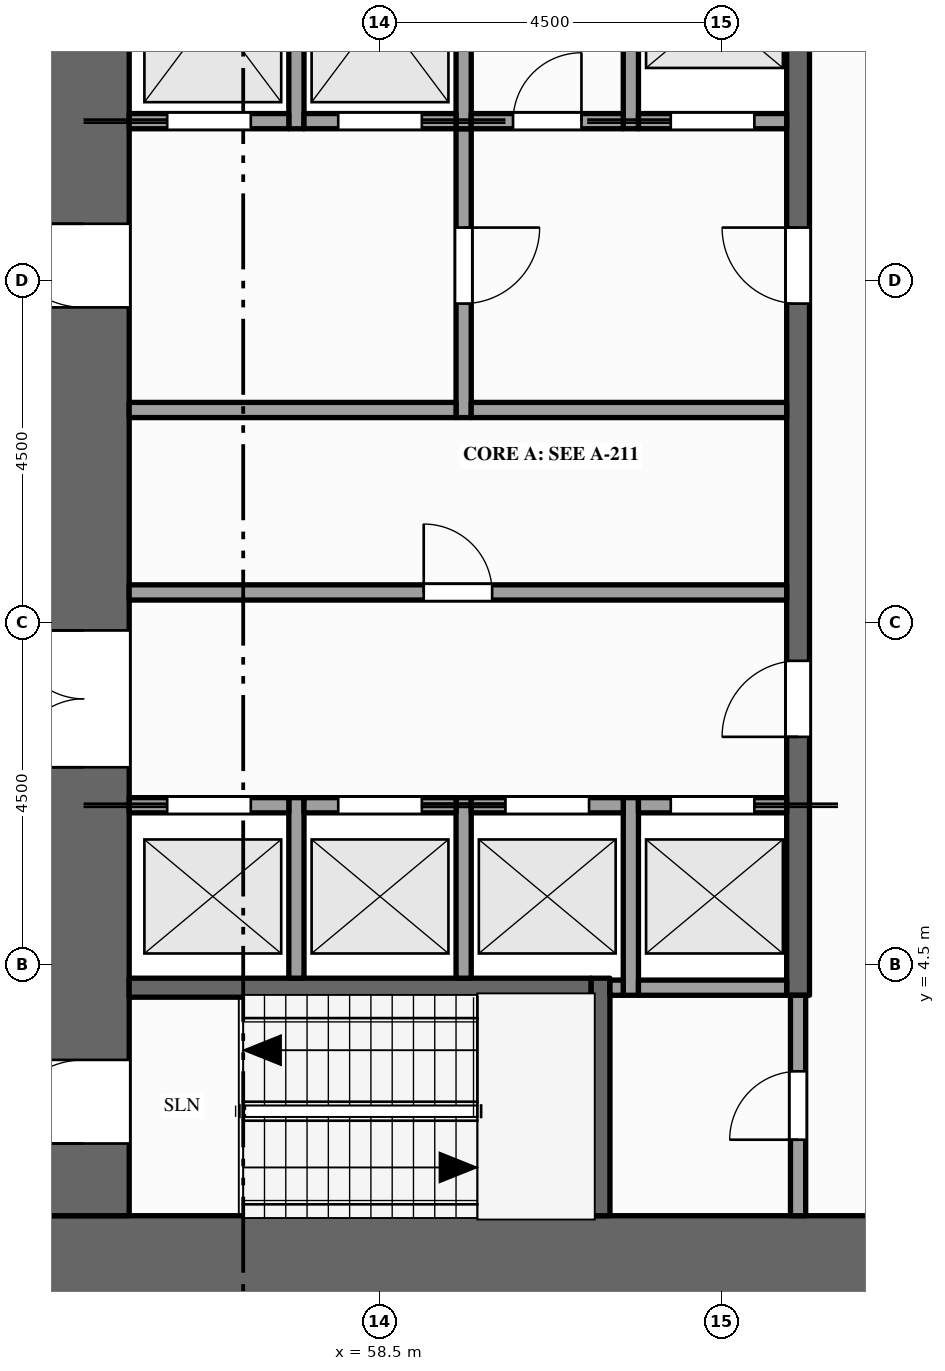
"""IFC4 building model, lengths in metres.
Left out: names, types, materials, properties, quantities, classifications, styles, units other than length and angle.
Written with IfcOpenShell. Run it as: python <this file> out.ifc"""

import sys

from ifc_helpers import new_model, si_unit, direction, frame, frame_2d, origin, place, context, subcontext, project, spatial, rectangle, extrude, element, fill, save


model = new_model("IFC4")
c1 = context("Model", 3, precision=1e-05, world=origin(), true_north=direction((0.0, 1.0)))
c2 = subcontext(c1, "Body", "Model", "MODEL_VIEW")
j1 = project(units=[si_unit("LENGTHUNIT", "METRE"), si_unit("PLANEANGLEUNIT", "RADIAN")], contexts=[c1])
p1 = place(None, origin())
s1 = spatial("IfcSite", under=j1, at=p1, CompositionType="ELEMENT")
p2 = place(p1, origin())
s2 = spatial("IfcBuilding", under=s1, at=p2, CompositionType="ELEMENT")
p3 = place(p2, frame((0.0, 0.0, 57.0)))
s3 = spatial("IfcBuildingStorey", under=s2, at=p3, CompositionType="ELEMENT", Elevation=57.0)
p4 = place(p3, frame((67.5, 0.6, -0.15), z_axis=(0.0, 0.0, 1.0), x_axis=(-1.0, 0.0, 0.0)))
e1 = element("IfcWall", 1, at=p4, inside=s3, PredefinedType="SHEAR", context=c2, shape_type="SweptSolid", body=[
    extrude(rectangle(XDim=13.5, YDim=1.2, at=frame_2d((6.75, 0.0))), origin(), (0.0, 0.0, 1.0), 4.0),
])
p5 = place(p3, frame((54.6, 1.2, -0.15), z_axis=(0.0, 0.0, 1.0), x_axis=(0.0, 1.0, 0.0)))
e2 = element("IfcWall", 2, at=p5, inside=s3, PredefinedType="SHEAR", context=c2, shape_type="SweptSolid", body=[
    extrude(rectangle(XDim=20.1, YDim=1.2, at=frame_2d((10.05, 0.0))), origin(), (0.0, 0.0, 1.0), 4.0),
])
p6 = place(p5, frame((5.9, 0.0, 0.15)))
e3 = element("IfcOpeningElement", 3, at=p6, cuts=e2, PredefinedType="OPENING", context=c2, shape_type="SweptSolid", body=[
    extrude(rectangle(XDim=1.8, YDim=2.1, at=frame_2d((0.9, 1.05))), frame((0.0, 0.61, 0.0), z_axis=(0.0, -1.0, 0.0), x_axis=(1.0, 0.0, 0.0)), (0.0, 0.0, 1.0), 1.22),
])
p7 = place(p5, frame((11.95, 0.0, 0.15)))
e4 = element("IfcOpeningElement", 4, at=p7, cuts=e2, PredefinedType="OPENING", context=c2, shape_type="SweptSolid", body=[
    extrude(rectangle(XDim=1.1, YDim=2.1, at=frame_2d((0.55, 1.05))), frame((0.0, 0.61, 0.0), z_axis=(0.0, -1.0, 0.0), x_axis=(1.0, 0.0, 0.0)), (0.0, 0.0, 1.0), 1.22),
])
p8 = place(p5, frame((0.95, 0.0, 0.15)))
e5 = element("IfcOpeningElement", 5, at=p8, cuts=e2, PredefinedType="OPENING", context=c2, shape_type="SweptSolid", body=[
    extrude(rectangle(XDim=1.1, YDim=2.1, at=frame_2d((0.55, 1.05))), frame((0.0, 0.61, 0.0), z_axis=(0.0, -1.0, 0.0), x_axis=(1.0, 0.0, 0.0)), (0.0, 0.0, 1.0), 1.22),
])
p9 = place(p5, frame((18.15, 0.0, 0.15)))
e6 = element("IfcOpeningElement", 6, at=p9, cuts=e2, PredefinedType="OPENING", context=c2, shape_type="SweptSolid", body=[
    extrude(rectangle(XDim=1.1, YDim=2.1, at=frame_2d((0.55, 1.05))), frame((0.0, 0.61, 0.0), z_axis=(0.0, -1.0, 0.0), x_axis=(1.0, 0.0, 0.0)), (0.0, 0.0, 1.0), 1.22),
])
p10 = place(p3, frame((57.4, 4.325, 0.0), z_axis=(0.0, 0.0, 1.0), x_axis=(0.0, 1.0, 0.0)))
e7 = element("IfcWall", 7, at=p10, inside=s3, PredefinedType="SOLIDWALL", context=c2, shape_type="SweptSolid", body=[
    extrude(rectangle(XDim=2.375, YDim=0.2, at=frame_2d((1.188, 0.0))), origin(), (0.0, 0.0, 1.0), 3.85),
])
p11 = place(p3, frame((57.4, 15.5, 0.0), z_axis=(0.0, 0.0, 1.0), x_axis=(0.0, 1.0, 0.0)))
e8 = element("IfcWall", 8, at=p11, inside=s3, PredefinedType="SOLIDWALL", context=c2, shape_type="SweptSolid", body=[
    extrude(rectangle(XDim=2.875, YDim=0.2, at=frame_2d((1.438, 0.0))), origin(), (0.0, 0.0, 1.0), 3.85),
])
p12 = place(p3, frame((59.6, 4.325, 0.0), z_axis=(0.0, 0.0, 1.0), x_axis=(0.0, 1.0, 0.0)))
e9 = element("IfcWall", 9, at=p12, inside=s3, PredefinedType="SOLIDWALL", context=c2, shape_type="SweptSolid", body=[
    extrude(rectangle(XDim=2.375, YDim=0.2, at=frame_2d((1.188, 0.0))), origin(), (0.0, 0.0, 1.0), 3.85),
])
p13 = place(p3, frame((59.6, 11.7, 0.0), z_axis=(0.0, 0.0, 1.0), x_axis=(0.0, 1.0, 0.0)))
e10 = element("IfcWall", 10, at=p13, inside=s3, PredefinedType="PARTITIONING", context=c2, shape_type="SweptSolid", body=[
    extrude(rectangle(XDim=3.8, YDim=0.2, at=frame_2d((1.9, 0.0))), origin(), (0.0, 0.0, 1.0), 3.85),
])
p14 = place(p13, frame((1.5, 0.0, 0.0)))
e11 = element("IfcOpeningElement", 11, at=p14, cuts=e10, PredefinedType="OPENING", context=c2, shape_type="SweptSolid", body=[
    extrude(rectangle(XDim=1.0, YDim=2.1, at=frame_2d((0.5, 1.05))), frame((0.0, 0.11, 0.0), z_axis=(0.0, -1.0, 0.0), x_axis=(1.0, 0.0, 0.0)), (0.0, 0.0, 1.0), 0.22),
])
p15 = place(p3, frame((59.6, 15.5, 0.0), z_axis=(0.0, 0.0, 1.0), x_axis=(0.0, 1.0, 0.0)))
e12 = element("IfcWall", 12, at=p15, inside=s3, PredefinedType="SOLIDWALL", context=c2, shape_type="SweptSolid", body=[
    extrude(rectangle(XDim=2.875, YDim=0.2, at=frame_2d((1.438, 0.0))), origin(), (0.0, 0.0, 1.0), 3.85),
])
p16 = place(p3, frame((61.4, 1.2, 0.0), z_axis=(0.0, 0.0, 1.0), x_axis=(0.0, 1.0, 0.0)))
e13 = element("IfcWall", 13, at=p16, inside=s3, PredefinedType="SHEAR", context=c2, shape_type="SweptSolid", body=[
    extrude(rectangle(XDim=3.125, YDim=0.25, at=frame_2d((1.562, 0.0))), origin(), (0.0, 0.0, 1.0), 3.85),
])
p17 = place(p3, frame((61.8, 4.1, 0.0), z_axis=(0.0, 0.0, 1.0), x_axis=(0.0, 1.0, 0.0)))
e14 = element("IfcWall", 14, at=p17, inside=s3, PredefinedType="SOLIDWALL", context=c2, shape_type="SweptSolid", body=[
    extrude(rectangle(XDim=2.6, YDim=0.2, at=frame_2d((1.3, 0.0))), origin(), (0.0, 0.0, 1.0), 3.85),
])
p18 = place(p3, frame((61.8, 15.5, 0.0), z_axis=(0.0, 0.0, 1.0), x_axis=(0.0, 1.0, 0.0)))
e15 = element("IfcWall", 15, at=p18, inside=s3, PredefinedType="SOLIDWALL", context=c2, shape_type="SweptSolid", body=[
    extrude(rectangle(XDim=3.1, YDim=0.2, at=frame_2d((1.55, 0.0))), origin(), (0.0, 0.0, 1.0), 3.85),
])
p19 = place(p3, frame((64.0, 1.2, 0.0), z_axis=(0.0, 0.0, 1.0), x_axis=(0.0, 1.0, 0.0)))
e16 = element("IfcWall", 16, at=p19, inside=s3, PredefinedType="PARTITIONING", context=c2, shape_type="SweptSolid", body=[
    extrude(rectangle(XDim=2.9, YDim=0.2, at=frame_2d((1.45, 0.0))), origin(), (0.0, 0.0, 1.0), 3.85),
])
p20 = place(p19, frame((1.0, 0.0, 0.0)))
e17 = element("IfcOpeningElement", 17, at=p20, cuts=e16, PredefinedType="OPENING", context=c2, shape_type="SweptSolid", body=[
    extrude(rectangle(XDim=0.9, YDim=2.1, at=frame_2d((0.45, 1.05))), frame((0.0, 0.11, 0.0), z_axis=(0.0, -1.0, 0.0), x_axis=(1.0, 0.0, 0.0)), (0.0, 0.0, 1.0), 0.22),
])
p21 = place(p3, frame((64.0, 4.1, 0.0), z_axis=(0.0, 0.0, 1.0), x_axis=(0.0, 1.0, 0.0)))
e18 = element("IfcWall", 18, at=p21, inside=s3, PredefinedType="SHEAR", context=c2, shape_type="SweptSolid", body=[
    extrude(rectangle(XDim=14.5, YDim=0.3, at=frame_2d((7.25, 0.0))), origin(), (0.0, 0.0, 1.0), 3.85),
])
p22 = place(p21, frame((3.4, 0.0, 0.0)))
e19 = element("IfcOpeningElement", 19, at=p22, cuts=e18, PredefinedType="OPENING", context=c2, shape_type="SweptSolid", body=[
    extrude(rectangle(XDim=1.0, YDim=2.1, at=frame_2d((0.5, 1.05))), frame((0.0, 0.16, 0.0), z_axis=(0.0, -1.0, 0.0), x_axis=(1.0, 0.0, 0.0)), (0.0, 0.0, 1.0), 0.32),
])
p23 = place(p21, frame((9.1, 0.0, 0.0)))
e20 = element("IfcOpeningElement", 20, at=p23, cuts=e18, PredefinedType="OPENING", context=c2, shape_type="SweptSolid", body=[
    extrude(rectangle(XDim=1.0, YDim=2.1, at=frame_2d((0.5, 1.05))), frame((0.0, 0.16, 0.0), z_axis=(0.0, -1.0, 0.0), x_axis=(1.0, 0.0, 0.0)), (0.0, 0.0, 1.0), 0.32),
])
p24 = place(p3, frame((55.2, 4.2, 0.0), z_axis=(0.0, 0.0, 1.0), x_axis=(1.0, 0.0, 0.0)))
e21 = element("IfcWall", 21, at=p24, inside=s3, PredefinedType="SHEAR", context=c2, shape_type="SweptSolid", body=[
    extrude(rectangle(XDim=6.075, YDim=0.25, at=frame_2d((3.038, 0.0))), origin(), (0.0, 0.0, 1.0), 3.85),
])
p25 = place(p3, frame((61.525, 4.2, 0.0), z_axis=(0.0, 0.0, 1.0), x_axis=(1.0, 0.0, 0.0)))
e22 = element("IfcWall", 22, at=p25, inside=s3, PredefinedType="SOLIDWALL", context=c2, shape_type="SweptSolid", body=[
    extrude(rectangle(XDim=0.175, YDim=0.2, at=frame_2d((0.087, 0.0))), origin(), (0.0, 0.0, 1.0), 3.85),
])
p26 = place(p3, frame((61.9, 4.2, 0.0), z_axis=(0.0, 0.0, 1.0), x_axis=(1.0, 0.0, 0.0)))
e23 = element("IfcWall", 23, at=p26, inside=s3, PredefinedType="SOLIDWALL", context=c2, shape_type="SweptSolid", body=[
    extrude(rectangle(XDim=1.95, YDim=0.2, at=frame_2d((0.975, 0.0))), origin(), (0.0, 0.0, 1.0), 3.85),
])
p27 = place(p3, frame((55.2, 6.6, 0.0), z_axis=(0.0, 0.0, 1.0), x_axis=(1.0, 0.0, 0.0)))
e24 = element("IfcWall", 24, at=p27, inside=s3, PredefinedType="SOLIDWALL", context=c2, shape_type="SweptSolid", body=[
    extrude(rectangle(XDim=2.1, YDim=0.2, at=frame_2d((1.05, 0.0))), origin(), (0.0, 0.0, 1.0), 3.85),
])
p28 = place(p27, frame((0.5, 0.0, 0.012)))
e25 = element("IfcOpeningElement", 25, at=p28, cuts=e24, PredefinedType="OPENING", context=c2, shape_type="SweptSolid", body=[
    extrude(rectangle(XDim=1.1, YDim=2.1, at=frame_2d((0.55, 1.05))), frame((0.0, 0.11, 0.0), z_axis=(0.0, -1.0, 0.0), x_axis=(1.0, 0.0, 0.0)), (0.0, 0.0, 1.0), 0.22),
])
p29 = place(p3, frame((57.5, 6.6, 0.0), z_axis=(0.0, 0.0, 1.0), x_axis=(1.0, 0.0, 0.0)))
e26 = element("IfcWall", 26, at=p29, inside=s3, PredefinedType="SOLIDWALL", context=c2, shape_type="SweptSolid", body=[
    extrude(rectangle(XDim=2.0, YDim=0.2, at=frame_2d((1.0, 0.0))), origin(), (0.0, 0.0, 1.0), 3.85),
])
p30 = place(p29, frame((0.45, 0.0, 0.012)))
e27 = element("IfcOpeningElement", 27, at=p30, cuts=e26, PredefinedType="OPENING", context=c2, shape_type="SweptSolid", body=[
    extrude(rectangle(XDim=1.1, YDim=2.1, at=frame_2d((0.55, 1.05))), frame((0.0, 0.11, 0.0), z_axis=(0.0, -1.0, 0.0), x_axis=(1.0, 0.0, 0.0)), (0.0, 0.0, 1.0), 0.22),
])
p31 = place(p3, frame((59.7, 6.6, 0.0), z_axis=(0.0, 0.0, 1.0), x_axis=(1.0, 0.0, 0.0)))
e28 = element("IfcWall", 28, at=p31, inside=s3, PredefinedType="SOLIDWALL", context=c2, shape_type="SweptSolid", body=[
    extrude(rectangle(XDim=2.0, YDim=0.2, at=frame_2d((1.0, 0.0))), origin(), (0.0, 0.0, 1.0), 3.85),
])
p32 = place(p31, frame((0.45, 0.0, 0.012)))
e29 = element("IfcOpeningElement", 29, at=p32, cuts=e28, PredefinedType="OPENING", context=c2, shape_type="SweptSolid", body=[
    extrude(rectangle(XDim=1.1, YDim=2.1, at=frame_2d((0.55, 1.05))), frame((0.0, 0.11, 0.0), z_axis=(0.0, -1.0, 0.0), x_axis=(1.0, 0.0, 0.0)), (0.0, 0.0, 1.0), 0.22),
])
p33 = place(p3, frame((61.9, 6.6, 0.0), z_axis=(0.0, 0.0, 1.0), x_axis=(1.0, 0.0, 0.0)))
e30 = element("IfcWall", 30, at=p33, inside=s3, PredefinedType="SOLIDWALL", context=c2, shape_type="SweptSolid", body=[
    extrude(rectangle(XDim=1.95, YDim=0.2, at=frame_2d((0.975, 0.0))), origin(), (0.0, 0.0, 1.0), 3.85),
])
p34 = place(p33, frame((0.425, 0.0, 0.012)))
e31 = element("IfcOpeningElement", 31, at=p34, cuts=e30, PredefinedType="OPENING", context=c2, shape_type="SweptSolid", body=[
    extrude(rectangle(XDim=1.1, YDim=2.1, at=frame_2d((0.55, 1.05))), frame((0.0, 0.11, 0.0), z_axis=(0.0, -1.0, 0.0), x_axis=(1.0, 0.0, 0.0)), (0.0, 0.0, 1.0), 0.22),
])
p35 = place(p3, frame((55.2, 9.4, 0.0), z_axis=(0.0, 0.0, 1.0), x_axis=(1.0, 0.0, 0.0)))
e32 = element("IfcWall", 32, at=p35, inside=s3, PredefinedType="PARTITIONING", context=c2, shape_type="SweptSolid", body=[
    extrude(rectangle(XDim=8.65, YDim=0.2, at=frame_2d((4.325, 0.0))), origin(), (0.0, 0.0, 1.0), 3.85),
])
p36 = place(p35, frame((3.875, 0.0, 0.0)))
e33 = element("IfcOpeningElement", 33, at=p36, cuts=e32, PredefinedType="OPENING", context=c2, shape_type="SweptSolid", body=[
    extrude(rectangle(XDim=0.9, YDim=2.1, at=frame_2d((0.45, 1.05))), frame((0.0, 0.11, 0.0), z_axis=(0.0, -1.0, 0.0), x_axis=(1.0, 0.0, 0.0)), (0.0, 0.0, 1.0), 0.22),
])
p37 = place(p3, frame((55.2, 11.8, 0.0), z_axis=(0.0, 0.0, 1.0), x_axis=(1.0, 0.0, 0.0)))
e34 = element("IfcWall", 34, at=p37, inside=s3, PredefinedType="PARTITIONING", context=c2, shape_type="SweptSolid", body=[
    extrude(rectangle(XDim=4.3, YDim=0.2, at=frame_2d((2.15, 0.0))), origin(), (0.0, 0.0, 1.0), 3.85),
])
p38 = place(p3, frame((59.7, 11.8, 0.0), z_axis=(0.0, 0.0, 1.0), x_axis=(1.0, 0.0, 0.0)))
e35 = element("IfcWall", 35, at=p38, inside=s3, PredefinedType="PARTITIONING", context=c2, shape_type="SweptSolid", body=[
    extrude(rectangle(XDim=4.15, YDim=0.2, at=frame_2d((2.075, 0.0))), origin(), (0.0, 0.0, 1.0), 3.85),
])
p39 = place(p3, frame((55.2, 15.6, 0.0), z_axis=(0.0, 0.0, 1.0), x_axis=(1.0, 0.0, 0.0)))
e36 = element("IfcWall", 36, at=p39, inside=s3, PredefinedType="SOLIDWALL", context=c2, shape_type="SweptSolid", body=[
    extrude(rectangle(XDim=2.1, YDim=0.2, at=frame_2d((1.05, 0.0))), origin(), (0.0, 0.0, 1.0), 3.85),
])
p40 = place(p39, frame((0.5, 0.0, 0.012)))
e37 = element("IfcOpeningElement", 37, at=p40, cuts=e36, PredefinedType="OPENING", context=c2, shape_type="SweptSolid", body=[
    extrude(rectangle(XDim=1.1, YDim=2.1, at=frame_2d((0.55, 1.05))), frame((0.0, 0.11, 0.0), z_axis=(0.0, -1.0, 0.0), x_axis=(1.0, 0.0, 0.0)), (0.0, 0.0, 1.0), 0.22),
])
p41 = place(p3, frame((57.5, 15.6, 0.0), z_axis=(0.0, 0.0, 1.0), x_axis=(1.0, 0.0, 0.0)))
e38 = element("IfcWall", 38, at=p41, inside=s3, PredefinedType="SOLIDWALL", context=c2, shape_type="SweptSolid", body=[
    extrude(rectangle(XDim=2.0, YDim=0.2, at=frame_2d((1.0, 0.0))), origin(), (0.0, 0.0, 1.0), 3.85),
])
p42 = place(p41, frame((0.45, 0.0, 0.012)))
e39 = element("IfcOpeningElement", 39, at=p42, cuts=e38, PredefinedType="OPENING", context=c2, shape_type="SweptSolid", body=[
    extrude(rectangle(XDim=1.1, YDim=2.1, at=frame_2d((0.55, 1.05))), frame((0.0, 0.11, 0.0), z_axis=(0.0, -1.0, 0.0), x_axis=(1.0, 0.0, 0.0)), (0.0, 0.0, 1.0), 0.22),
])
p43 = place(p3, frame((59.7, 15.6, 0.0), z_axis=(0.0, 0.0, 1.0), x_axis=(1.0, 0.0, 0.0)))
e40 = element("IfcWall", 40, at=p43, inside=s3, PredefinedType="PARTITIONING", context=c2, shape_type="SweptSolid", body=[
    extrude(rectangle(XDim=2.0, YDim=0.2, at=frame_2d((1.0, 0.0))), origin(), (0.0, 0.0, 1.0), 3.85),
])
p44 = place(p43, frame((0.55, 0.0, 0.0)))
e41 = element("IfcOpeningElement", 41, at=p44, cuts=e40, PredefinedType="OPENING", context=c2, shape_type="SweptSolid", body=[
    extrude(rectangle(XDim=0.9, YDim=2.1, at=frame_2d((0.45, 1.05))), frame((0.0, 0.11, 0.0), z_axis=(0.0, -1.0, 0.0), x_axis=(1.0, 0.0, 0.0)), (0.0, 0.0, 1.0), 0.22),
])
p45 = place(p3, frame((61.9, 15.6, 0.0), z_axis=(0.0, 0.0, 1.0), x_axis=(1.0, 0.0, 0.0)))
e42 = element("IfcWall", 42, at=p45, inside=s3, PredefinedType="SOLIDWALL", context=c2, shape_type="SweptSolid", body=[
    extrude(rectangle(XDim=1.95, YDim=0.2, at=frame_2d((0.975, 0.0))), origin(), (0.0, 0.0, 1.0), 3.85),
])
p46 = place(p45, frame((0.425, 0.0, 0.012)))
e43 = element("IfcOpeningElement", 43, at=p46, cuts=e42, PredefinedType="OPENING", context=c2, shape_type="SweptSolid", body=[
    extrude(rectangle(XDim=1.1, YDim=2.1, at=frame_2d((0.55, 1.05))), frame((0.0, 0.11, 0.0), z_axis=(0.0, -1.0, 0.0), x_axis=(1.0, 0.0, 0.0)), (0.0, 0.0, 1.0), 0.22),
])
p47 = place(p28, origin())
e44 = element("IfcDoor", 44, at=p47, inside=s3, OperationType="SLIDING_TO_LEFT", PredefinedType="DOOR", context=c2, shape_type="SweptSolid", body=[
    extrude(rectangle(XDim=1.1, YDim=2.1, at=frame_2d((0.55, 1.05))), frame((0.0, 0.025, 0.0), z_axis=(0.0, -1.0, 0.0), x_axis=(1.0, 0.0, 0.0)), (0.0, 0.0, 1.0), 0.05),
])
fill(e25, e44)
p48 = place(p30, origin())
e45 = element("IfcDoor", 45, at=p48, inside=s3, OperationType="SLIDING_TO_RIGHT", PredefinedType="DOOR", context=c2, shape_type="SweptSolid", body=[
    extrude(rectangle(XDim=1.1, YDim=2.1, at=frame_2d((0.55, 1.05))), frame((0.0, 0.025, 0.0), z_axis=(0.0, -1.0, 0.0), x_axis=(1.0, 0.0, 0.0)), (0.0, 0.0, 1.0), 0.05),
])
fill(e27, e45)
p49 = place(p32, origin())
e46 = element("IfcDoor", 46, at=p49, inside=s3, OperationType="SLIDING_TO_LEFT", PredefinedType="DOOR", context=c2, shape_type="SweptSolid", body=[
    extrude(rectangle(XDim=1.1, YDim=2.1, at=frame_2d((0.55, 1.05))), frame((0.0, 0.025, 0.0), z_axis=(0.0, -1.0, 0.0), x_axis=(1.0, 0.0, 0.0)), (0.0, 0.0, 1.0), 0.05),
])
fill(e29, e46)
p50 = place(p34, origin())
e47 = element("IfcDoor", 47, at=p50, inside=s3, OperationType="SLIDING_TO_RIGHT", PredefinedType="DOOR", context=c2, shape_type="SweptSolid", body=[
    extrude(rectangle(XDim=1.1, YDim=2.1, at=frame_2d((0.55, 1.05))), frame((0.0, 0.025, 0.0), z_axis=(0.0, -1.0, 0.0), x_axis=(1.0, 0.0, 0.0)), (0.0, 0.0, 1.0), 0.05),
])
fill(e31, e47)
p51 = place(p40, origin())
e48 = element("IfcDoor", 48, at=p51, inside=s3, OperationType="SLIDING_TO_LEFT", PredefinedType="DOOR", context=c2, shape_type="SweptSolid", body=[
    extrude(rectangle(XDim=1.1, YDim=2.1, at=frame_2d((0.55, 1.05))), frame((0.0, 0.025, 0.0), z_axis=(0.0, -1.0, 0.0), x_axis=(1.0, 0.0, 0.0)), (0.0, 0.0, 1.0), 0.05),
])
fill(e37, e48)
p52 = place(p42, origin())
e49 = element("IfcDoor", 49, at=p52, inside=s3, OperationType="SLIDING_TO_RIGHT", PredefinedType="DOOR", context=c2, shape_type="SweptSolid", body=[
    extrude(rectangle(XDim=1.1, YDim=2.1, at=frame_2d((0.55, 1.05))), frame((0.0, 0.025, 0.0), z_axis=(0.0, -1.0, 0.0), x_axis=(1.0, 0.0, 0.0)), (0.0, 0.0, 1.0), 0.05),
])
fill(e39, e49)
p53 = place(p46, origin())
e50 = element("IfcDoor", 50, at=p53, inside=s3, OperationType="SLIDING_TO_LEFT", PredefinedType="DOOR", context=c2, shape_type="SweptSolid", body=[
    extrude(rectangle(XDim=1.1, YDim=2.1, at=frame_2d((0.55, 1.05))), frame((0.0, 0.025, 0.0), z_axis=(0.0, -1.0, 0.0), x_axis=(1.0, 0.0, 0.0)), (0.0, 0.0, 1.0), 0.05),
])
fill(e43, e50)
p54 = place(p6, origin())
e51 = element("IfcDoor", 51, at=p54, inside=s3, OperationType="DOUBLE_DOOR_SINGLE_SWING", PredefinedType="DOOR", context=c2, shape_type="SweptSolid", body=[
    extrude(rectangle(XDim=1.8, YDim=2.1, at=frame_2d((0.9, 1.05))), frame((0.0, 0.025, 0.0), z_axis=(0.0, -1.0, 0.0), x_axis=(1.0, 0.0, 0.0)), (0.0, 0.0, 1.0), 0.05),
])
fill(e3, e51)
p55 = place(p22, origin())
e52 = element("IfcDoor", 52, at=p55, inside=s3, OperationType="SINGLE_SWING_LEFT", PredefinedType="DOOR", context=c2, shape_type="SweptSolid", body=[
    extrude(rectangle(XDim=1.0, YDim=2.1, at=frame_2d((0.5, 1.05))), frame((0.0, 0.025, 0.0), z_axis=(0.0, -1.0, 0.0), x_axis=(1.0, 0.0, 0.0)), (0.0, 0.0, 1.0), 0.05),
])
fill(e19, e52)
p56 = place(p7, origin())
e53 = element("IfcDoor", 53, at=p56, inside=s3, OperationType="SINGLE_SWING_RIGHT", PredefinedType="DOOR", context=c2, shape_type="SweptSolid", body=[
    extrude(rectangle(XDim=1.1, YDim=2.1, at=frame_2d((0.55, 1.05))), frame((0.0, 0.025, 0.0), z_axis=(0.0, -1.0, 0.0), x_axis=(1.0, 0.0, 0.0)), (0.0, 0.0, 1.0), 0.05),
])
fill(e4, e53)
p57 = place(p14, origin())
e54 = element("IfcDoor", 54, at=p57, inside=s3, OperationType="SINGLE_SWING_RIGHT", PredefinedType="DOOR", context=c2, shape_type="SweptSolid", body=[
    extrude(rectangle(XDim=1.0, YDim=2.1, at=frame_2d((0.5, 1.05))), frame((0.0, 0.025, 0.0), z_axis=(0.0, -1.0, 0.0), x_axis=(1.0, 0.0, 0.0)), (0.0, 0.0, 1.0), 0.05),
])
fill(e11, e54)
p58 = place(p23, origin())
e55 = element("IfcDoor", 55, at=p58, inside=s3, OperationType="SINGLE_SWING_RIGHT", PredefinedType="DOOR", context=c2, shape_type="SweptSolid", body=[
    extrude(rectangle(XDim=1.0, YDim=2.1, at=frame_2d((0.5, 1.05))), frame((0.0, 0.025, 0.0), z_axis=(0.0, -1.0, 0.0), x_axis=(1.0, 0.0, 0.0)), (0.0, 0.0, 1.0), 0.05),
])
fill(e20, e55)
p59 = place(p8, origin())
e56 = element("IfcDoor", 56, at=p59, inside=s3, OperationType="SINGLE_SWING_LEFT", PredefinedType="DOOR", context=c2, shape_type="SweptSolid", body=[
    extrude(rectangle(XDim=1.1, YDim=2.1, at=frame_2d((0.55, 1.05))), frame((0.0, 0.025, 0.0), z_axis=(0.0, -1.0, 0.0), x_axis=(1.0, 0.0, 0.0)), (0.0, 0.0, 1.0), 0.05),
])
fill(e5, e56)
p60 = place(p20, origin())
e57 = element("IfcDoor", 57, at=p60, inside=s3, OperationType="SINGLE_SWING_LEFT", PredefinedType="DOOR", context=c2, shape_type="SweptSolid", body=[
    extrude(rectangle(XDim=0.9, YDim=2.1, at=frame_2d((0.45, 1.05))), frame((0.0, 0.025, 0.0), z_axis=(0.0, -1.0, 0.0), x_axis=(1.0, 0.0, 0.0)), (0.0, 0.0, 1.0), 0.05),
])
fill(e17, e57)
p61 = place(p36, origin())
e58 = element("IfcDoor", 58, at=p61, inside=s3, OperationType="SINGLE_SWING_LEFT", PredefinedType="DOOR", context=c2, shape_type="SweptSolid", body=[
    extrude(rectangle(XDim=0.9, YDim=2.1, at=frame_2d((0.45, 1.05))), frame((0.0, 0.025, 0.0), z_axis=(0.0, -1.0, 0.0), x_axis=(1.0, 0.0, 0.0)), (0.0, 0.0, 1.0), 0.05),
])
fill(e33, e58)
p62 = place(p44, origin())
e59 = element("IfcDoor", 59, at=p62, inside=s3, OperationType="SINGLE_SWING_RIGHT", PredefinedType="DOOR", context=c2, shape_type="SweptSolid", body=[
    extrude(rectangle(XDim=0.9, YDim=2.1, at=frame_2d((0.45, 1.05))), frame((0.0, 0.025, 0.0), z_axis=(0.0, -1.0, 0.0), x_axis=(1.0, 0.0, 0.0)), (0.0, 0.0, 1.0), 0.05),
])
fill(e41, e59)
save(model, sys.argv[1])
